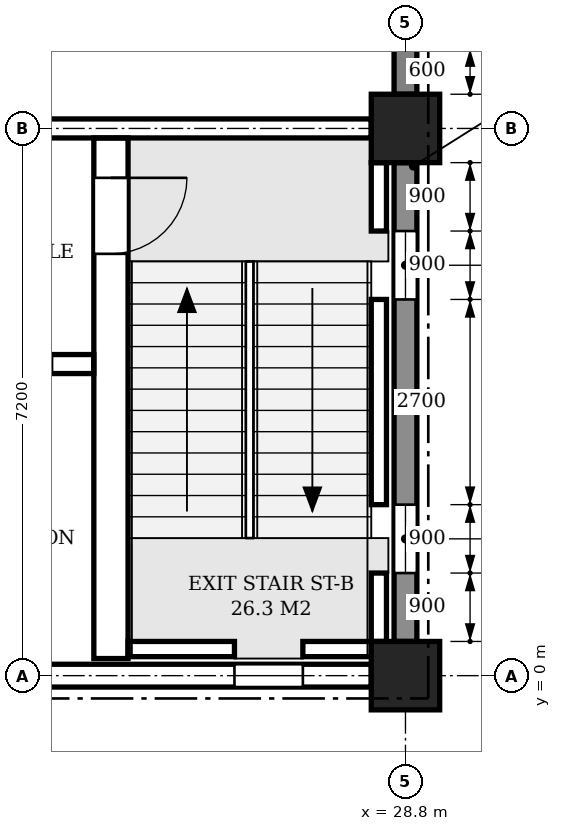
"""IFC4 building model, lengths in metres.
Left out: names, types, materials, properties, quantities, classifications, styles, units other than length and angle.
Written with IfcOpenShell. Run it as: python <this file> out.ifc"""

import sys

from ifc_helpers import new_model, si_unit, direction, frame, frame_2d, origin, origin_2d, place, context, subcontext, project, spatial, polyline, rectangle, outline, extrude, element, fill, save


model = new_model("IFC4")
c1 = context("Model", 3, precision=1e-05, world=origin(), true_north=direction((0.0, 1.0)))
c2 = subcontext(c1, "Body", "Model", "MODEL_VIEW")
j1 = project(units=[si_unit("LENGTHUNIT", "METRE"), si_unit("PLANEANGLEUNIT", "RADIAN")], contexts=[c1])
p1 = place(None, origin())
s1 = spatial("IfcSite", under=j1, at=p1, CompositionType="ELEMENT")
p2 = place(p1, origin())
s2 = spatial("IfcBuilding", under=s1, at=p2, CompositionType="ELEMENT")
p3 = place(p2, frame((0.0, 0.0, 31.2)))
s3 = spatial("IfcBuildingStorey", under=s2, at=p3, CompositionType="ELEMENT", Elevation=31.2)
for number, where, z_axis, x_axis in (
    (1, (28.8, 0.0, 0.0), (0.0, 0.0, 1.0), (1.0, 0.0, 0.0)),
    (2, (28.8, 7.2, 0.0), (0.0, 0.0, 1.0), (1.0, 0.0, 0.0)),
):
    element("IfcColumn", number, at=place(p3, frame(where, z_axis=z_axis, x_axis=x_axis)), inside=s3, PredefinedType="COLUMN", context=c2, shape_type="SweptSolid", body=[
        extrude(rectangle(XDim=0.9, YDim=0.9, at=origin_2d()), origin(), (0.0, 0.0, 1.0), 4.8),
    ])
p4 = place(p3, frame((22.05, 0.0, 0.0), z_axis=(0.0, 0.0, 1.0), x_axis=(1.0, 0.0, 0.0)))
e3 = element("IfcWall", 3, at=p4, inside=s3, PredefinedType="STANDARD", context=c2, shape_type="SweptSolid", body=[
    extrude(rectangle(XDim=6.3, YDim=0.3, at=frame_2d((3.15, 0.0))), origin(), (0.0, 0.0, 1.0), 3.95),
])
p5 = place(p4, frame((4.5, 0.0, 0.9)))
e4 = element("IfcOpeningElement", 4, at=p5, cuts=e3, PredefinedType="OPENING", context=c2, shape_type="SweptSolid", body=[
    extrude(outline(polyline([(0.0, 0.0), (0.9, 0.0), (0.9, 2.05), (0.45, 2.5), (0.0, 2.05), (0.0, 0.0)])), frame((0.0, 0.16, 0.0), z_axis=(0.0, -1.0, 0.0), x_axis=(1.0, 0.0, 0.0)), (0.0, 0.0, 1.0), 0.32),
])
p6 = place(p3, frame((28.8, 0.45, 0.0), z_axis=(0.0, 0.0, 1.0), x_axis=(0.0, 1.0, 0.0)))
e5 = element("IfcWall", 5, at=p6, inside=s3, PredefinedType="STANDARD", context=c2, shape_type="SweptSolid", body=[
    extrude(rectangle(XDim=6.3, YDim=0.3, at=frame_2d((3.15, 0.0))), origin(), (0.0, 0.0, 1.0), 3.95),
])
p7 = place(p6, frame((0.9, 0.0, 0.9)))
e6 = element("IfcOpeningElement", 6, at=p7, cuts=e5, PredefinedType="OPENING", context=c2, shape_type="SweptSolid", body=[
    extrude(outline(polyline([(0.0, 0.0), (0.9, 0.0), (0.9, 2.05), (0.45, 2.5), (0.0, 2.05), (0.0, 0.0)])), frame((0.0, 0.16, 0.0), z_axis=(0.0, -1.0, 0.0), x_axis=(1.0, 0.0, 0.0)), (0.0, 0.0, 1.0), 0.32),
])
p8 = place(p6, frame((4.5, 0.0, 0.9)))
e7 = element("IfcOpeningElement", 7, at=p8, cuts=e5, PredefinedType="OPENING", context=c2, shape_type="SweptSolid", body=[
    extrude(outline(polyline([(0.0, 0.0), (0.9, 0.0), (0.9, 2.05), (0.45, 2.5), (0.0, 2.05), (0.0, 0.0)])), frame((0.0, 0.16, 0.0), z_axis=(0.0, -1.0, 0.0), x_axis=(1.0, 0.0, 0.0)), (0.0, 0.0, 1.0), 0.32),
])
p9 = place(p3, frame((28.8, 7.65, 0.0), z_axis=(0.0, 0.0, 1.0), x_axis=(0.0, 1.0, 0.0)))
e8 = element("IfcWall", 8, at=p9, inside=s3, PredefinedType="STANDARD", context=c2, shape_type="SweptSolid", body=[
    extrude(rectangle(XDim=6.3, YDim=0.3, at=frame_2d((3.15, 0.0))), origin(), (0.0, 0.0, 1.0), 3.95),
])
p10 = place(p9, frame((0.6, 0.0, 0.9)))
e9 = element("IfcOpeningElement", 9, at=p10, cuts=e8, PredefinedType="OPENING", context=c2, shape_type="SweptSolid", body=[
    extrude(outline(polyline([(0.0, 0.0), (1.5, 0.0), (1.5, 1.75), (0.75, 2.5), (0.0, 1.75), (0.0, 0.0)])), frame((0.0, 0.16, 0.0), z_axis=(0.0, -1.0, 0.0), x_axis=(1.0, 0.0, 0.0)), (0.0, 0.0, 1.0), 0.32),
])
p11 = place(p3, frame((22.05, 7.2, 0.0), z_axis=(0.0, 0.0, 1.0), x_axis=(1.0, 0.0, 0.0)))
e10 = element("IfcWall", 10, at=p11, inside=s3, PredefinedType="SHEAR", context=c2, shape_type="SweptSolid", body=[
    extrude(rectangle(XDim=6.3, YDim=0.25, at=frame_2d((3.15, 0.0))), origin(), (0.0, 0.0, 1.0), 3.8),
])
p12 = place(p11, frame((0.4, 0.0, 0.0)))
e11 = element("IfcOpeningElement", 11, at=p12, cuts=e10, PredefinedType="OPENING", context=c2, shape_type="SweptSolid", body=[
    extrude(rectangle(XDim=1.1, YDim=2.1, at=frame_2d((0.55, 1.05))), frame((0.0, 0.135, 0.0), z_axis=(0.0, -1.0, 0.0), x_axis=(1.0, 0.0, 0.0)), (0.0, 0.0, 1.0), 0.27),
])
p13 = place(p3, frame((28.45, 0.45, -0.25), z_axis=(0.0, 0.0, 1.0), x_axis=(0.0, 1.0, 0.0)))
e12 = element("IfcWall", 12, at=p13, inside=s3, PredefinedType="SHEAR", context=c2, shape_type="SweptSolid", body=[
    extrude(rectangle(XDim=0.9, YDim=0.2, at=frame_2d((0.45, 0.0))), origin(), (0.0, 0.0, 1.0), 4.8),
])
p14 = place(p3, frame((28.45, 2.25, -0.25), z_axis=(0.0, 0.0, 1.0), x_axis=(0.0, 1.0, 0.0)))
e13 = element("IfcWall", 13, at=p14, inside=s3, PredefinedType="SHEAR", context=c2, shape_type="SweptSolid", body=[
    extrude(rectangle(XDim=2.7, YDim=0.2, at=frame_2d((1.35, 0.0))), origin(), (0.0, 0.0, 1.0), 4.8),
])
p15 = place(p3, frame((28.45, 5.85, -0.25), z_axis=(0.0, 0.0, 1.0), x_axis=(0.0, 1.0, 0.0)))
e14 = element("IfcWall", 14, at=p15, inside=s3, PredefinedType="SHEAR", context=c2, shape_type="SweptSolid", body=[
    extrude(rectangle(XDim=0.9, YDim=0.2, at=frame_2d((0.45, 0.0))), origin(), (0.0, 0.0, 1.0), 4.8),
])
p16 = place(p3, frame((25.15, 0.35, -0.25), z_axis=(0.0, 0.0, 1.0), x_axis=(1.0, 0.0, 0.0)))
e15 = element("IfcWall", 15, at=p16, inside=s3, PredefinedType="SHEAR", context=c2, shape_type="SweptSolid", body=[
    extrude(rectangle(XDim=1.4, YDim=0.2, at=frame_2d((0.7, 0.0))), origin(), (0.0, 0.0, 1.0), 4.8),
])
p17 = place(p3, frame((27.45, 0.35, -0.25), z_axis=(0.0, 0.0, 1.0), x_axis=(1.0, 0.0, 0.0)))
e16 = element("IfcWall", 16, at=p17, inside=s3, PredefinedType="SHEAR", context=c2, shape_type="SweptSolid", body=[
    extrude(rectangle(XDim=0.9, YDim=0.2, at=frame_2d((0.45, 0.0))), origin(), (0.0, 0.0, 1.0), 4.8),
])
p18 = place(p3, frame((24.925, 0.225, 0.0), z_axis=(0.0, 0.0, 1.0), x_axis=(0.0, 1.0, 0.0)))
e17 = element("IfcWall", 17, at=p18, inside=s3, PredefinedType="SHEAR", context=c2, shape_type="SweptSolid", body=[
    extrude(rectangle(XDim=6.85, YDim=0.45, at=frame_2d((3.425, 0.0))), origin(), (0.0, 0.0, 1.0), 4.55),
])
p19 = place(p18, frame((5.325, 0.0, 0.0)))
e18 = element("IfcOpeningElement", 18, at=p19, cuts=e17, PredefinedType="OPENING", context=c2, shape_type="SweptSolid", body=[
    extrude(rectangle(XDim=1.0, YDim=2.1, at=frame_2d((0.5, 1.05))), frame((0.0, 0.235, 0.0), z_axis=(0.0, -1.0, 0.0), x_axis=(1.0, 0.0, 0.0)), (0.0, 0.0, 1.0), 0.47),
])
p20 = place(p3, frame((21.725, 4.1, 0.0), z_axis=(0.0, 0.0, 1.0), x_axis=(1.0, 0.0, 0.0)))
e19 = element("IfcWall", 19, at=p20, inside=s3, PredefinedType="SHEAR", context=c2, shape_type="SweptSolid", body=[
    extrude(rectangle(XDim=2.975, YDim=0.25, at=frame_2d((1.487, 0.0))), origin(), (0.0, 0.0, 1.0), 4.55),
])
p21 = place(p20, frame((1.525, 0.0, 0.0)))
e20 = element("IfcOpeningElement", 20, at=p21, cuts=e19, PredefinedType="OPENING", context=c2, shape_type="SweptSolid", body=[
    extrude(rectangle(XDim=0.9, YDim=2.1, at=frame_2d((0.45, 1.05))), frame((0.0, 0.135, 0.0), z_axis=(0.0, -1.0, 0.0), x_axis=(1.0, 0.0, 0.0)), (0.0, 0.0, 1.0), 0.27),
])
p22 = place(p7, origin())
e21 = element("IfcWindow", 21, at=p22, inside=s3, PartitioningType="SINGLE_PANEL", PredefinedType="WINDOW", context=c2, shape_type="SweptSolid", body=[
    extrude(outline(polyline([(0.0, 0.0), (0.9, 0.0), (0.9, 2.05), (0.45, 2.5), (0.0, 2.05), (0.0, 0.0)])), frame((0.0, 0.03, 0.0), z_axis=(0.0, -1.0, 0.0), x_axis=(1.0, 0.0, 0.0)), (0.0, 0.0, 1.0), 0.06),
])
fill(e6, e21)
p23 = place(p8, origin())
e22 = element("IfcWindow", 22, at=p23, inside=s3, PartitioningType="SINGLE_PANEL", PredefinedType="WINDOW", context=c2, shape_type="SweptSolid", body=[
    extrude(outline(polyline([(0.0, 0.0), (0.9, 0.0), (0.9, 2.05), (0.45, 2.5), (0.0, 2.05), (0.0, 0.0)])), frame((0.0, 0.03, 0.0), z_axis=(0.0, -1.0, 0.0), x_axis=(1.0, 0.0, 0.0)), (0.0, 0.0, 1.0), 0.06),
])
fill(e7, e22)
p24 = place(p5, origin())
e23 = element("IfcWindow", 23, at=p24, inside=s3, PartitioningType="SINGLE_PANEL", PredefinedType="WINDOW", context=c2, shape_type="SweptSolid", body=[
    extrude(outline(polyline([(0.0, 0.0), (0.9, 0.0), (0.9, 2.05), (0.45, 2.5), (0.0, 2.05), (0.0, 0.0)])), frame((0.0, 0.03, 0.0), z_axis=(0.0, -1.0, 0.0), x_axis=(1.0, 0.0, 0.0)), (0.0, 0.0, 1.0), 0.06),
])
fill(e4, e23)
p25 = place(p19, frame((1.0, 0.0, 0.0), z_axis=(0.0, 0.0, 1.0), x_axis=(-1.0, 0.0, 0.0)))
e24 = element("IfcDoor", 24, at=p25, inside=s3, OperationType="SINGLE_SWING_LEFT", PredefinedType="DOOR", context=c2, shape_type="SweptSolid", body=[
    extrude(rectangle(XDim=1.0, YDim=2.1, at=frame_2d((0.5, 1.05))), frame((0.0, 0.025, 0.0), z_axis=(0.0, -1.0, 0.0), x_axis=(1.0, 0.0, 0.0)), (0.0, 0.0, 1.0), 0.05),
])
fill(e18, e24)
save(model, sys.argv[1])
